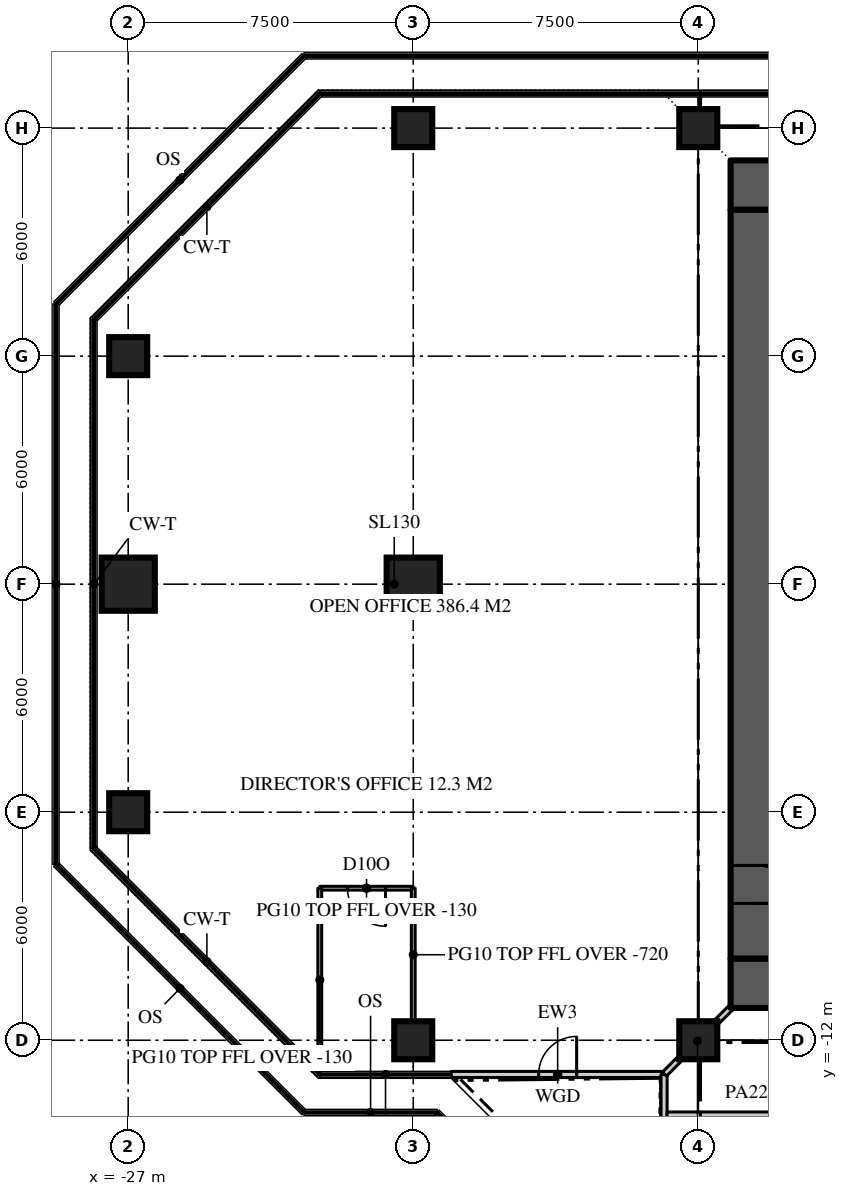
"""IFC4 building model, lengths in metres.
Left out: names, types, materials, properties, quantities, classifications, styles, units other than length and angle.
Written with IfcOpenShell. Run it as: python <this file> out.ifc"""

import sys

from ifc_helpers import new_model, si_unit, direction, frame, frame_2d, origin, origin_2d, place, context, subcontext, project, spatial, rectangle, extrude, element, fill, save


model = new_model("IFC4")
c1 = context("Model", 3, precision=1e-05, world=origin(), true_north=direction((0.0, 1.0)))
c2 = subcontext(c1, "Body", "Model", "MODEL_VIEW")
j1 = project(units=[si_unit("LENGTHUNIT", "METRE"), si_unit("PLANEANGLEUNIT", "RADIAN")], contexts=[c1])
p1 = place(None, origin())
s1 = spatial("IfcSite", under=j1, at=p1, CompositionType="ELEMENT")
p2 = place(p1, origin())
s2 = spatial("IfcBuilding", under=s1, at=p2, CompositionType="ELEMENT")
p3 = place(p2, frame((0.0, 0.0, 286.8)))
s3 = spatial("IfcBuildingStorey", under=s2, at=p3, CompositionType="ELEMENT", Elevation=286.8)
p4 = place(p3, frame((-11.15, 10.5, 0.0), z_axis=(0.0, 0.0, 1.0), x_axis=(1.0, 0.0, 0.0)))
e1 = element("IfcWall", 1, at=p4, inside=s3, PredefinedType="SHEAR", context=c2, shape_type="SweptSolid", body=[
    extrude(rectangle(XDim=22.3, YDim=1.3, at=frame_2d((11.15, 0.0))), origin(), (0.0, 0.0, 1.0), 3.9),
])
p5 = place(p4, frame((4.25, 0.0, 0.0)))
e2 = element("IfcOpeningElement", 2, at=p5, cuts=e1, PredefinedType="OPENING", context=c2, shape_type="SweptSolid", body=[
    extrude(rectangle(XDim=1.8, YDim=2.2, at=frame_2d((0.9, 1.1))), frame((0.0, 0.66, 0.0), z_axis=(0.0, -1.0, 0.0), x_axis=(1.0, 0.0, 0.0)), (0.0, 0.0, 1.0), 1.32),
])
p6 = place(p4, frame((16.25, 0.0, 0.0)))
e3 = element("IfcOpeningElement", 3, at=p6, cuts=e1, PredefinedType="OPENING", context=c2, shape_type="SweptSolid", body=[
    extrude(rectangle(XDim=1.8, YDim=2.2, at=frame_2d((0.9, 1.1))), frame((0.0, 0.66, 0.0), z_axis=(0.0, -1.0, 0.0), x_axis=(1.0, 0.0, 0.0)), (0.0, 0.0, 1.0), 1.32),
])
p7 = place(p3, frame((11.15, -10.5, 0.0), z_axis=(0.0, 0.0, 1.0), x_axis=(-1.0, 0.0, 0.0)))
e4 = element("IfcWall", 4, at=p7, inside=s3, PredefinedType="SHEAR", context=c2, shape_type="SweptSolid", body=[
    extrude(rectangle(XDim=22.3, YDim=1.3, at=frame_2d((11.15, 0.0))), origin(), (0.0, 0.0, 1.0), 3.9),
])
p8 = place(p7, frame((16.25, 0.0, 0.0)))
e5 = element("IfcOpeningElement", 5, at=p8, cuts=e4, PredefinedType="OPENING", context=c2, shape_type="SweptSolid", body=[
    extrude(rectangle(XDim=1.8, YDim=2.2, at=frame_2d((0.9, 1.1))), frame((0.0, 0.66, 0.0), z_axis=(0.0, -1.0, 0.0), x_axis=(1.0, 0.0, 0.0)), (0.0, 0.0, 1.0), 1.32),
])
p9 = place(p7, frame((4.25, 0.0, 0.0)))
e6 = element("IfcOpeningElement", 6, at=p9, cuts=e4, PredefinedType="OPENING", context=c2, shape_type="SweptSolid", body=[
    extrude(rectangle(XDim=1.8, YDim=2.2, at=frame_2d((0.9, 1.1))), frame((0.0, 0.66, 0.0), z_axis=(0.0, -1.0, 0.0), x_axis=(1.0, 0.0, 0.0)), (0.0, 0.0, 1.0), 1.32),
])
p10 = place(p3, frame((-10.5, 9.85, 0.0), z_axis=(0.0, 0.0, 1.0), x_axis=(0.0, -1.0, 0.0)))
e7 = element("IfcWall", 7, at=p10, inside=s3, PredefinedType="SHEAR", context=c2, shape_type="SweptSolid", body=[
    extrude(rectangle(XDim=19.7, YDim=1.3, at=frame_2d((9.85, 0.0))), origin(), (0.0, 0.0, 1.0), 3.9),
])
p11 = place(p10, frame((17.25, 0.0, 0.0)))
e8 = element("IfcOpeningElement", 8, at=p11, cuts=e7, PredefinedType="OPENING", context=c2, shape_type="SweptSolid", body=[
    extrude(rectangle(XDim=1.0, YDim=2.2, at=frame_2d((0.5, 1.1))), frame((0.0, 0.66, 0.0), z_axis=(0.0, -1.0, 0.0), x_axis=(1.0, 0.0, 0.0)), (0.0, 0.0, 1.0), 1.32),
])
for number, where, z_axis, x_axis in (
    (9, (-19.5, -12.0, 0.0), (0.0, 0.0, 1.0), (1.0, 0.0, 0.0)),
    (10, (-12.0, -12.0, 0.0), (0.0, 0.0, 1.0), (1.0, 0.0, 0.0)),
    (11, (-27.0, -6.0, 0.0), (0.0, 0.0, 1.0), (1.0, 0.0, 0.0)),
):
    element("IfcColumn", number, at=place(p3, frame(where, z_axis=z_axis, x_axis=x_axis)), inside=s3, PredefinedType="COLUMN", context=c2, shape_type="SweptSolid", body=[
        extrude(rectangle(XDim=1.0, YDim=1.0, at=origin_2d()), origin(), (0.0, 0.0, 1.0), 3.9),
    ])
for number, where, z_axis, x_axis in (
    (12, (-27.0, 0.0, 0.0), (0.0, 0.0, 1.0), (1.0, 0.0, 0.0)),
    (13, (-19.5, 0.0, 0.0), (0.0, 0.0, 1.0), (1.0, 0.0, 0.0)),
):
    element("IfcColumn", number, at=place(p3, frame(where, z_axis=z_axis, x_axis=x_axis)), inside=s3, PredefinedType="COLUMN", context=c2, shape_type="SweptSolid", body=[
        extrude(rectangle(XDim=1.4, YDim=1.4, at=origin_2d()), origin(), (0.0, 0.0, 1.0), 3.9),
    ])
for number, where, z_axis, x_axis in (
    (14, (-27.0, 6.0, 0.0), (0.0, 0.0, 1.0), (1.0, 0.0, 0.0)),
    (15, (-19.5, 12.0, 0.0), (0.0, 0.0, 1.0), (1.0, 0.0, 0.0)),
    (16, (-12.0, 12.0, 0.0), (0.0, 0.0, 1.0), (1.0, 0.0, 0.0)),
):
    element("IfcColumn", number, at=place(p3, frame(where, z_axis=z_axis, x_axis=x_axis)), inside=s3, PredefinedType="COLUMN", context=c2, shape_type="SweptSolid", body=[
        extrude(rectangle(XDim=1.0, YDim=1.0, at=origin_2d()), origin(), (0.0, 0.0, 1.0), 3.9),
    ])
p12 = place(p3, frame((-18.5, -12.9, 0.0), z_axis=(0.0, 0.0, 1.0), x_axis=(1.0, 0.0, 0.0)))
e17 = element("IfcWall", 17, at=p12, inside=s3, PredefinedType="SOLIDWALL", context=c2, shape_type="SweptSolid", body=[
    extrude(rectangle(XDim=5.6, YDim=0.16, at=frame_2d((2.8, 0.0))), origin(), (0.0, 0.0, 1.0), 3.77),
])
p13 = place(p12, frame((2.3, 0.0, 0.0)))
e18 = element("IfcOpeningElement", 18, at=p13, cuts=e17, PredefinedType="OPENING", context=c2, shape_type="SweptSolid", body=[
    extrude(rectangle(XDim=1.0, YDim=2.2, at=frame_2d((0.5, 1.1))), frame((0.0, 0.09, 0.0), z_axis=(0.0, -1.0, 0.0), x_axis=(1.0, 0.0, 0.0)), (0.0, 0.0, 1.0), 0.18),
])
p14 = place(p3, frame((-12.9, -12.9, 0.0), z_axis=(0.0, 0.0, 1.0), x_axis=(0.0, -1.0, 0.0)))
e19 = element("IfcWall", 19, at=p14, inside=s3, PredefinedType="SOLIDWALL", context=c2, shape_type="SweptSolid", body=[
    extrude(rectangle(XDim=5.6, YDim=0.16, at=frame_2d((2.8, 0.0))), origin(), (0.0, 0.0, 1.0), 3.77),
])
p15 = place(p3, frame((-19.5, -8.0, 0.0), z_axis=(0.0, 0.0, 1.0), x_axis=(-1.0, 0.0, 0.0)))
e20 = element("IfcWall", 20, at=p15, inside=s3, PredefinedType="PARTITIONING", context=c2, shape_type="SweptSolid", body=[
    extrude(rectangle(XDim=2.459, YDim=0.1, at=frame_2d((1.229, 0.0))), origin(), (0.0, 0.0, 1.0), 3.77),
])
p16 = place(p15, frame((0.729, 0.0, 0.0)))
e21 = element("IfcOpeningElement", 21, at=p16, cuts=e20, PredefinedType="OPENING", context=c2, shape_type="SweptSolid", body=[
    extrude(rectangle(XDim=1.0, YDim=2.2, at=frame_2d((0.5, 1.1))), frame((0.0, 0.06, 0.0), z_axis=(0.0, -1.0, 0.0), x_axis=(1.0, 0.0, 0.0)), (0.0, 0.0, 1.0), 0.12),
])
p17 = place(p3, frame((-19.5, -8.0, 0.0), z_axis=(0.0, 0.0, 1.0), x_axis=(0.0, -1.0, 0.0)))
e22 = element("IfcWall", 22, at=p17, inside=s3, PredefinedType="PARTITIONING", context=c2, shape_type="SweptSolid", body=[
    extrude(rectangle(XDim=3.5, YDim=0.1, at=frame_2d((1.75, 0.0))), origin(), (0.0, 0.0, 1.0), 3.18),
])
p18 = place(p3, frame((-21.959, -8.0, 0.0), z_axis=(0.0, 0.0, 1.0), x_axis=(0.0, -1.0, 0.0)))
e23 = element("IfcWall", 23, at=p18, inside=s3, PredefinedType="PARTITIONING", context=c2, shape_type="SweptSolid", body=[
    extrude(rectangle(XDim=4.82, YDim=0.1, at=frame_2d((2.41, 0.0))), origin(), (0.0, 0.0, 1.0), 3.77),
])
p19 = place(p3, frame((-4.0, -14.0, 0.0), z_axis=(0.0, 0.0, 1.0), x_axis=(-1.0, 0.0, 0.0)))
e24 = element("IfcWall", 24, at=p19, inside=s3, PredefinedType="PARTITIONING", context=c2, shape_type="SweptSolid", body=[
    extrude(rectangle(XDim=8.82, YDim=0.225, at=frame_2d((4.41, 0.0))), origin(), (0.0, 0.0, 1.0), 3.18),
])
p20 = place(p3, frame((-11.15, -11.15, 0.0), z_axis=(0.0, 0.0, 1.0), x_axis=(-0.707106781187, -0.707106781187, 0.0)))
e25 = element("IfcWall", 25, at=p20, inside=s3, PredefinedType="PARTITIONING", context=c2, shape_type="SweptSolid", body=[
    extrude(rectangle(XDim=2.461, YDim=0.15, at=frame_2d((1.23, 0.0))), origin(), (0.0, 0.0, 1.0), 3.22),
])
p21 = place(p13, origin())
e26 = element("IfcDoor", 26, at=p21, inside=s3, OperationType="SINGLE_SWING_RIGHT", PredefinedType="DOOR", context=c2, shape_type="SweptSolid", body=[
    extrude(rectangle(XDim=1.0, YDim=2.2, at=frame_2d((0.5, 1.1))), frame((0.0, 0.025, 0.0), z_axis=(0.0, -1.0, 0.0), x_axis=(1.0, 0.0, 0.0)), (0.0, 0.0, 1.0), 0.05),
])
fill(e18, e26)
p22 = place(p11, origin())
e27 = element("IfcDoor", 27, at=p22, inside=s3, OperationType="SINGLE_SWING_RIGHT", PredefinedType="DOOR", context=c2, shape_type="SweptSolid", body=[
    extrude(rectangle(XDim=1.0, YDim=2.2, at=frame_2d((0.5, 1.1))), frame((0.0, 0.025, 0.0), z_axis=(0.0, -1.0, 0.0), x_axis=(1.0, 0.0, 0.0)), (0.0, 0.0, 1.0), 0.05),
])
fill(e8, e27)
p23 = place(p16, origin())
e28 = element("IfcDoor", 28, at=p23, inside=s3, OperationType="SINGLE_SWING_LEFT", PredefinedType="DOOR", context=c2, shape_type="SweptSolid", body=[
    extrude(rectangle(XDim=1.0, YDim=2.2, at=frame_2d((0.5, 1.1))), frame((0.0, 0.025, 0.0), z_axis=(0.0, -1.0, 0.0), x_axis=(1.0, 0.0, 0.0)), (0.0, 0.0, 1.0), 0.05),
])
fill(e21, e28)
save(model, sys.argv[1])
